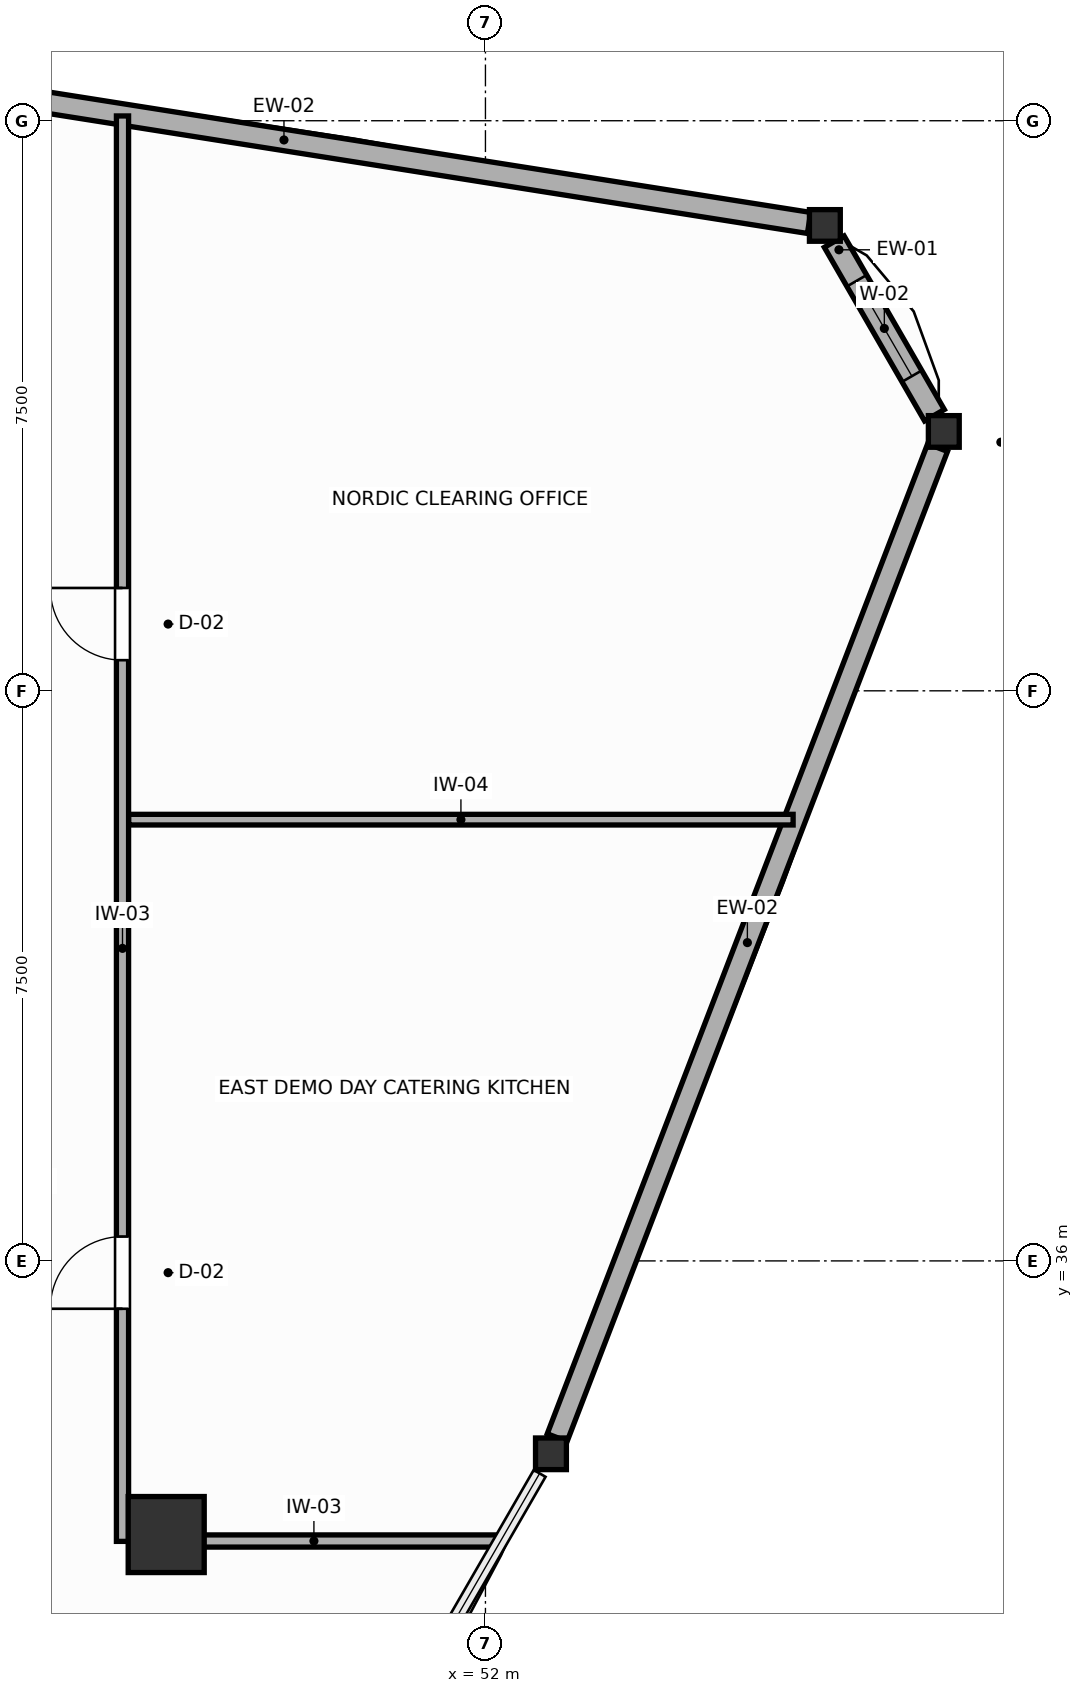
"""IFC4 building model, lengths in metres.
Left out: names, types, materials, properties, quantities, classifications, styles, units other than length and angle.
Written with IfcOpenShell. Run it as: python <this file> out.ifc"""

import sys

from ifc_helpers import new_model, si_unit, direction, frame, frame_2d, origin, origin_2d, place, context, subcontext, project, spatial, rectangle, i_section, extrude, source, transform, mapped, element, fill, save


model = new_model("IFC4")
c1 = context("Model", 3, precision=1e-05, world=origin(), true_north=direction((0.0, 1.0)))
c2 = subcontext(c1, "Body", "Model", "MODEL_VIEW")
j1 = project(units=[si_unit("LENGTHUNIT", "METRE"), si_unit("PLANEANGLEUNIT", "RADIAN")], contexts=[c1])
p1 = place(None, origin())
s1 = spatial("IfcSite", under=j1, at=p1, CompositionType="ELEMENT")
p2 = place(p1, origin())
s2 = spatial("IfcBuilding", under=s1, at=p2, CompositionType="ELEMENT")
p3 = place(p2, frame((0.0, 0.0, 190.2)))
s3 = spatial("IfcBuildingStorey", under=s2, at=p3, CompositionType="ELEMENT", Elevation=190.2)
m1 = source(origin(), c2, "Body", "SweptSolid", [
    extrude(rectangle(XDim=1.0, YDim=1.0, at=origin_2d()), origin(), (0.0, 0.0, 1.0), 3.6),
])
p4 = place(p3, frame((47.8, 32.4, 0.0), z_axis=(0.0, 0.0, 1.0), x_axis=(1.0, 0.0, 0.0)))
e1 = element("IfcColumn", 1, at=p4, inside=s3, PredefinedType="COLUMN", context=c2, shape_type="MappedRepresentation", body=[
    mapped(m1, transform((0.0, 0.0, 0.0), scale=1.0)),
])
m2 = source(origin(), c2, "Body", "SweptSolid", [
    extrude(i_section(OverallWidth=0.406, OverallDepth=0.416, WebThickness=0.027, FlangeThickness=0.044, FilletRadius=0.015, at=origin_2d()), origin(), (0.0, 0.0, 1.0), 3.6),
])
for number, where, z_axis, x_axis in (
    (2, (58.03, 46.912, 0.0), (0.0, 0.0, 1.0), (1.0, 0.0, 0.0)),
    (3, (56.466, 49.623, 0.0), (0.0, 0.0, 1.0), (1.0, 0.0, 0.0)),
    (4, (52.862, 33.462, 0.0), (0.0, 0.0, 1.0), (1.0, 0.0, 0.0)),
):
    element("IfcColumn", number, at=place(p3, frame(where, z_axis=z_axis, x_axis=x_axis)), inside=s3, PredefinedType="COLUMN", context=c2, shape_type="MappedRepresentation", body=[
        mapped(m2, transform((0.0, 0.0, 0.0), scale=1.0)),
    ])
p5 = place(p3, frame((57.907, 47.125, 0.0), z_axis=(0.0, 0.0, 1.0), x_axis=(-0.500061666259, 0.865989797826, 0.0)))
e5 = element("IfcWall", 5, at=p5, inside=s3, PredefinedType="SOLIDWALL", context=c2, shape_type="SweptSolid", body=[
    extrude(rectangle(XDim=2.637, YDim=0.3, at=frame_2d((1.319, 0.0))), origin(), (0.0, 0.0, 1.0), 3.01),
])
p6 = place(p5, frame((0.594, 0.0, 0.75)))
e6 = element("IfcOpeningElement", 6, at=p6, cuts=e5, PredefinedType="OPENING", context=c2, shape_type="SweptSolid", body=[
    extrude(rectangle(XDim=1.45, YDim=1.65, at=frame_2d((0.725, 0.825))), frame((0.0, 0.16, 0.0), z_axis=(0.0, -1.0, 0.0), x_axis=(1.0, 0.0, 0.0)), (0.0, 0.0, 1.0), 0.32),
])
p7 = place(p3, frame((56.258, 49.656, 0.0), z_axis=(0.0, 0.0, 1.0), x_axis=(-0.987743003355, 0.15608894683, 0.0)))
e7 = element("IfcWall", 7, at=p7, inside=s3, PredefinedType="SOLIDWALL", context=c2, shape_type="SweptSolid", body=[
    extrude(rectangle(XDim=13.988, YDim=0.28, at=frame_2d((6.994, 0.0))), origin(), (0.0, 0.0, 1.0), 3.01),
])
p8 = place(p3, frame((52.944, 33.675, 0.0), z_axis=(0.0, 0.0, 1.0), x_axis=(0.358703519473, 0.933451544065, 0.0)))
e8 = element("IfcWall", 8, at=p8, inside=s3, PredefinedType="SOLIDWALL", context=c2, shape_type="SweptSolid", body=[
    extrude(rectangle(XDim=13.953, YDim=0.28, at=frame_2d((6.976, 0.0))), origin(), (0.0, 0.0, 1.0), 3.01),
])
p9 = place(p3, frame((47.225, 32.31, 0.0), z_axis=(0.0, 0.0, 1.0), x_axis=(0.0, 1.0, 0.0)))
e9 = element("IfcWall", 9, at=p9, inside=s3, PredefinedType="PARTITIONING", context=c2, shape_type="SweptSolid", body=[
    extrude(rectangle(XDim=18.753, YDim=0.16, at=frame_2d((9.376, 0.0))), origin(), (0.0, 0.0, 1.0), 3.4),
])
p10 = place(p9, frame((3.06, 0.0, 0.0)))
e10 = element("IfcOpeningElement", 10, at=p10, cuts=e9, PredefinedType="OPENING", context=c2, shape_type="SweptSolid", body=[
    extrude(rectangle(XDim=0.95, YDim=2.05, at=frame_2d((0.475, 1.025))), frame((0.0, 0.09, 0.0), z_axis=(0.0, -1.0, 0.0), x_axis=(1.0, 0.0, 0.0)), (0.0, 0.0, 1.0), 0.18),
])
p11 = place(p9, frame((11.593, 0.0, 0.0)))
e11 = element("IfcOpeningElement", 11, at=p11, cuts=e9, PredefinedType="OPENING", context=c2, shape_type="SweptSolid", body=[
    extrude(rectangle(XDim=0.95, YDim=2.05, at=frame_2d((0.475, 1.025))), frame((0.0, 0.09, 0.0), z_axis=(0.0, -1.0, 0.0), x_axis=(1.0, 0.0, 0.0)), (0.0, 0.0, 1.0), 0.18),
])
p12 = place(p3, frame((47.307, 32.315, 0.0), z_axis=(0.0, 0.0, 1.0), x_axis=(1.0, 0.0, 0.0)))
e12 = element("IfcWall", 12, at=p12, inside=s3, PredefinedType="PARTITIONING", context=c2, shape_type="SweptSolid", body=[
    extrude(rectangle(XDim=4.873, YDim=0.16, at=frame_2d((2.437, 0.0))), origin(), (0.0, 0.0, 1.0), 2.95),
])
p13 = place(p3, frame((47.307, 41.805, 0.0), z_axis=(0.0, 0.0, 1.0), x_axis=(1.0, 0.0, 0.0)))
e13 = element("IfcWall", 13, at=p13, inside=s3, PredefinedType="PARTITIONING", context=c2, shape_type="SweptSolid", body=[
    extrude(rectangle(XDim=8.741, YDim=0.14, at=frame_2d((4.37, 0.0))), origin(), (0.0, 0.0, 1.0), 3.4),
])
p14 = place(p6, origin())
e14 = element("IfcWindow", 14, at=p14, inside=s3, PartitioningType="SINGLE_PANEL", PredefinedType="WINDOW", context=c2, shape_type="SweptSolid", body=[
    extrude(rectangle(XDim=1.45, YDim=1.65, at=frame_2d((0.725, 0.825))), frame((0.0, 0.03, 0.0), z_axis=(0.0, -1.0, 0.0), x_axis=(1.0, 0.0, 0.0)), (0.0, 0.0, 1.0), 0.06),
])
fill(e6, e14)
p15 = place(p10, origin())
e15 = element("IfcDoor", 15, at=p15, inside=s3, OperationType="SINGLE_SWING_LEFT", PredefinedType="DOOR", context=c2, shape_type="SweptSolid", body=[
    extrude(rectangle(XDim=0.95, YDim=2.05, at=frame_2d((0.475, 1.025))), frame((0.0, 0.025, 0.0), z_axis=(0.0, -1.0, 0.0), x_axis=(1.0, 0.0, 0.0)), (0.0, 0.0, 1.0), 0.05),
])
fill(e10, e15)
p16 = place(p11, origin())
e16 = element("IfcDoor", 16, at=p16, inside=s3, OperationType="SINGLE_SWING_RIGHT", PredefinedType="DOOR", context=c2, shape_type="SweptSolid", body=[
    extrude(rectangle(XDim=0.95, YDim=2.05, at=frame_2d((0.475, 1.025))), frame((0.0, 0.025, 0.0), z_axis=(0.0, -1.0, 0.0), x_axis=(1.0, 0.0, 0.0)), (0.0, 0.0, 1.0), 0.05),
])
fill(e11, e16)
save(model, sys.argv[1])
